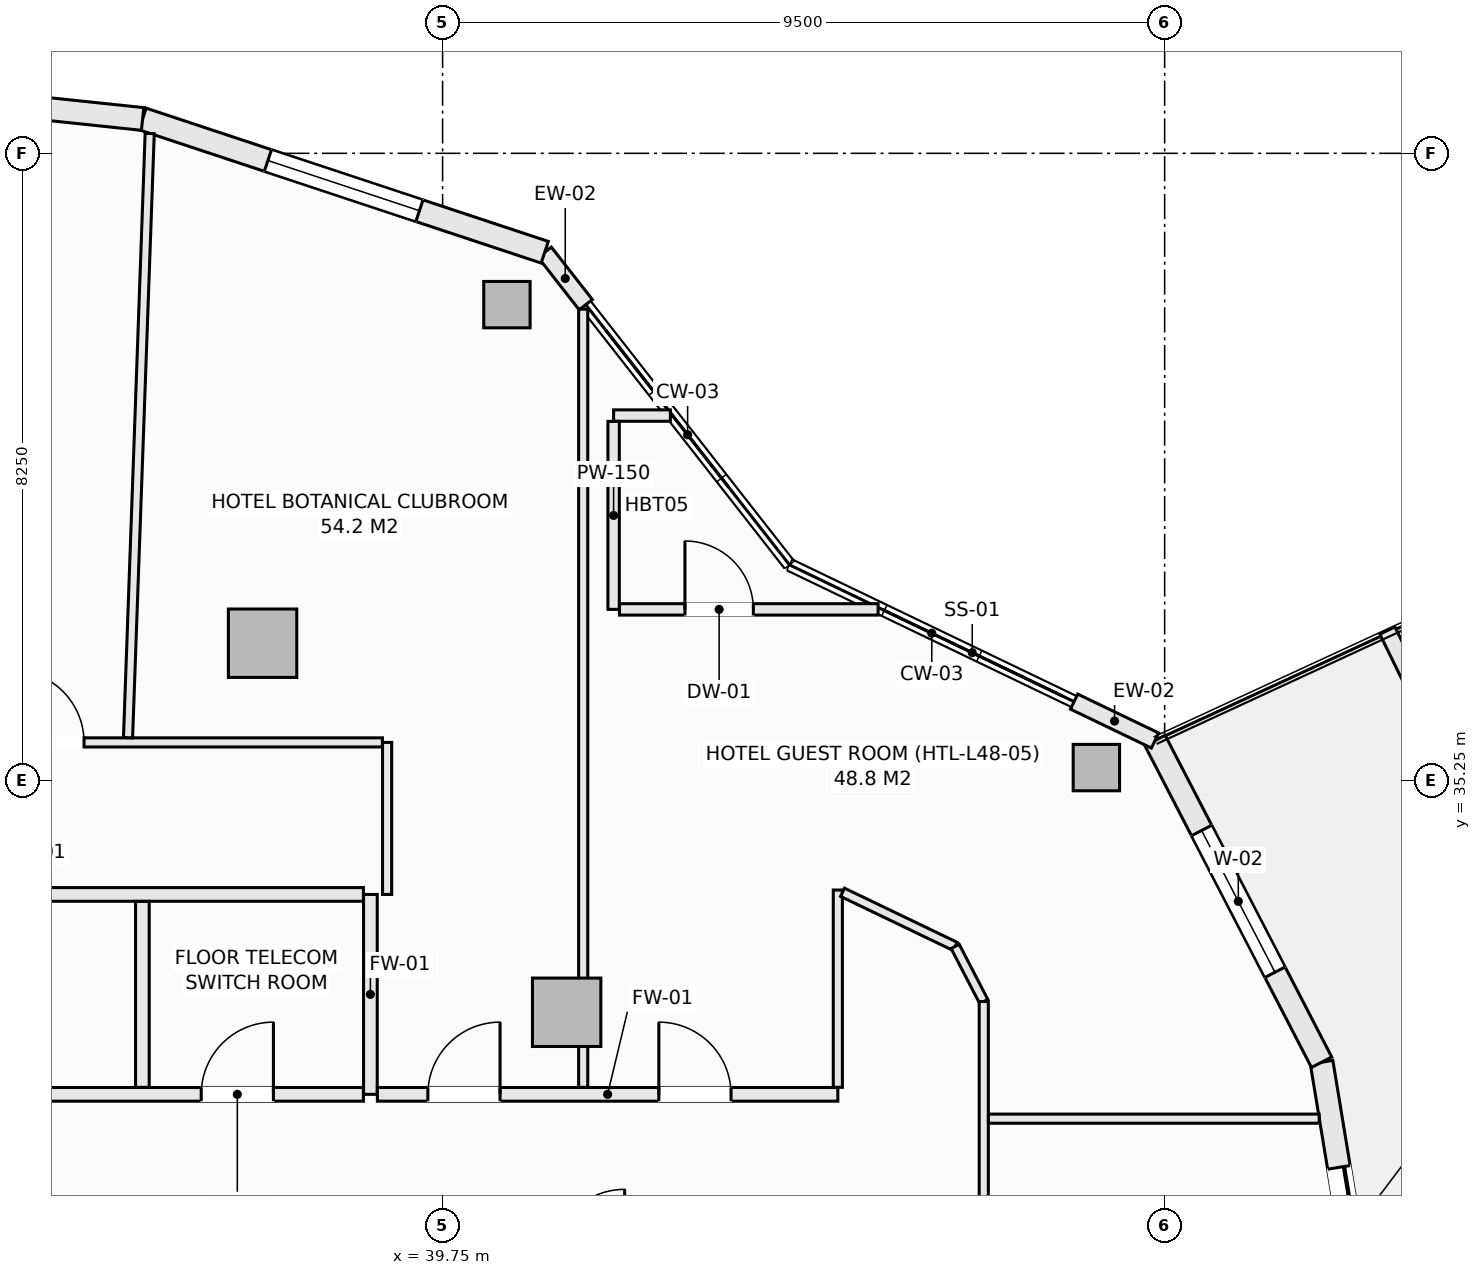
"""IFC4 building model, lengths in metres.
Left out: names, types, materials, properties, quantities, classifications, styles, units other than length and angle.
Written with IfcOpenShell. Run it as: python <this file> out.ifc"""

import sys

from ifc_helpers import new_model, si_unit, direction, frame, frame_2d, origin, origin_2d, place, context, subcontext, project, spatial, rectangle, hollow_rectangle, extrude, element, fill, save


model = new_model("IFC4")
c1 = context("Model", 3, precision=1e-05, world=origin(), true_north=direction((0.0, 1.0)))
c2 = subcontext(c1, "Body", "Model", "MODEL_VIEW")
j1 = project(units=[si_unit("LENGTHUNIT", "METRE"), si_unit("PLANEANGLEUNIT", "RADIAN")], contexts=[c1])
p1 = place(None, origin())
s1 = spatial("IfcSite", under=j1, at=p1, CompositionType="ELEMENT")
p2 = place(p1, origin())
s2 = spatial("IfcBuilding", under=s1, at=p2, CompositionType="ELEMENT")
p3 = place(p2, frame((0.0, 0.0, 183.5)))
s3 = spatial("IfcBuildingStorey", under=s2, at=p3, CompositionType="ELEMENT", Elevation=183.5)
for number, where, z_axis, x_axis in (
    (1, (48.352, 35.419, -0.27), (0.0, 0.0, 1.0), (1.0, 0.0, 0.0)),
    (2, (40.596, 41.51, -0.27), (0.0, 0.0, 1.0), (1.0, 0.0, 0.0)),
):
    element("IfcColumn", number, at=place(p3, frame(where, z_axis=z_axis, x_axis=x_axis)), inside=s3, PredefinedType="COLUMN", context=c2, shape_type="SweptSolid", body=[
        extrude(hollow_rectangle(XDim=0.61, YDim=0.61, WallThickness=0.025, at=origin_2d()), origin(), (0.0, 0.0, 1.0), 3.35),
    ])
for number, where, z_axis, x_axis in (
    (3, (41.382, 32.199, -0.27), (0.0, 0.0, 1.0), (1.0, 0.0, 0.0)),
    (4, (37.382, 37.055, -0.27), (0.0, 0.0, 1.0), (1.0, 0.0, 0.0)),
):
    element("IfcColumn", number, at=place(p3, frame(where, z_axis=z_axis, x_axis=x_axis)), inside=s3, PredefinedType="COLUMN", context=c2, shape_type="SweptSolid", body=[
        extrude(rectangle(XDim=0.9, YDim=0.9, at=origin_2d()), origin(), (0.0, 0.0, 1.0), 3.35),
    ])
p4 = place(p3, frame((51.315, 31.542, 0.0), z_axis=(0.0, 0.0, 1.0), x_axis=(0.162394765401, -0.986725868806, 0.0)))
e5 = element("IfcWall", 5, at=p4, inside=s3, PredefinedType="SOLIDWALL", context=c2, shape_type="SweptSolid", body=[
    extrude(rectangle(XDim=4.603, YDim=0.3, at=frame_2d((2.302, 0.0))), origin(), (0.0, 0.0, 1.0), 2.603),
])
p5 = place(p4, frame((1.402, 0.0, 0.0)))
e6 = element("IfcOpeningElement", 6, at=p5, cuts=e5, PredefinedType="OPENING", context=c2, shape_type="SweptSolid", body=[
    extrude(rectangle(XDim=1.8, YDim=2.25, at=frame_2d((0.9, 1.125))), frame((0.0, 0.16, 0.0), z_axis=(0.0, -1.0, 0.0), x_axis=(1.0, 0.0, 0.0)), (0.0, 0.0, 1.0), 0.32),
])
p6 = place(p3, frame((49.123, 35.775, 0.0), z_axis=(0.0, 0.0, 1.0), x_axis=(0.459810251451, -0.888017191647, 0.0)))
e7 = element("IfcWall", 7, at=p6, inside=s3, PredefinedType="SOLIDWALL", context=c2, shape_type="SweptSolid", body=[
    extrude(rectangle(XDim=4.766, YDim=0.3, at=frame_2d((2.383, 0.0))), origin(), (0.0, 0.0, 1.0), 2.603),
])
p7 = place(p6, frame((1.333, 0.0, 0.74)))
e8 = element("IfcOpeningElement", 8, at=p7, cuts=e7, PredefinedType="OPENING", context=c2, shape_type="SweptSolid", body=[
    extrude(rectangle(XDim=2.1, YDim=1.7, at=frame_2d((1.05, 0.85))), frame((0.0, 0.16, 0.0), z_axis=(0.0, -1.0, 0.0), x_axis=(1.0, 0.0, 0.0)), (0.0, 0.0, 1.0), 0.32),
])
p8 = place(p3, frame((48.059, 36.287, 0.0), z_axis=(0.0, 0.0, 1.0), x_axis=(0.901303636532, -0.433187897769, 0.0)))
e9 = element("IfcWall", 9, at=p8, inside=s3, PredefinedType="SOLIDWALL", context=c2, shape_type="SweptSolid", body=[
    extrude(rectangle(XDim=1.181, YDim=0.22, at=frame_2d((0.591, 0.0))), origin(), (0.0, 0.0, 1.0), 2.603),
])
p9 = place(p3, frame((41.094, 42.199, 0.0), z_axis=(0.0, 0.0, 1.0), x_axis=(0.616368366719, -0.787457958566, 0.0)))
e10 = element("IfcWall", 10, at=p9, inside=s3, PredefinedType="SOLIDWALL", context=c2, shape_type="SweptSolid", body=[
    extrude(rectangle(XDim=0.876, YDim=0.22, at=frame_2d((0.438, 0.0))), origin(), (0.0, 0.0, 1.0), 2.603),
])
p10 = place(p3, frame((35.803, 43.952, 0.0), z_axis=(0.0, 0.0, 1.0), x_axis=(0.949246811547, -0.314532177636, 0.0)))
e11 = element("IfcWall", 11, at=p10, inside=s3, PredefinedType="SOLIDWALL", context=c2, shape_type="SweptSolid", body=[
    extrude(rectangle(XDim=5.574, YDim=0.3, at=frame_2d((2.787, 0.0))), origin(), (0.0, 0.0, 1.0), 2.603),
])
p11 = place(p10, frame((1.737, 0.0, 0.74)))
e12 = element("IfcOpeningElement", 12, at=p11, cuts=e11, PredefinedType="OPENING", context=c2, shape_type="SweptSolid", body=[
    extrude(rectangle(XDim=2.1, YDim=1.7, at=frame_2d((1.05, 0.85))), frame((0.0, 0.16, 0.0), z_axis=(0.0, -1.0, 0.0), x_axis=(1.0, 0.0, 0.0)), (0.0, 0.0, 1.0), 0.32),
])
p12 = place(p3, frame((30.125, 44.55, 0.0), z_axis=(0.0, 0.0, 1.0), x_axis=(0.994496545245, -0.104769372887, 0.0)))
e13 = element("IfcWall", 13, at=p12, inside=s3, PredefinedType="SOLIDWALL", context=c2, shape_type="SweptSolid", body=[
    extrude(rectangle(XDim=5.709, YDim=0.3, at=frame_2d((2.854, 0.0))), origin(), (0.0, 0.0, 1.0), 2.603),
])
p13 = place(p12, frame((1.805, 0.0, 0.74)))
e14 = element("IfcOpeningElement", 14, at=p13, cuts=e13, PredefinedType="OPENING", context=c2, shape_type="SweptSolid", body=[
    extrude(rectangle(XDim=2.1, YDim=1.7, at=frame_2d((1.05, 0.85))), frame((0.0, 0.16, 0.0), z_axis=(0.0, -1.0, 0.0), x_axis=(1.0, 0.0, 0.0)), (0.0, 0.0, 1.0), 0.32),
])
p14 = place(p3, frame((52.18, 37.221, 0.0), z_axis=(0.0, 0.0, 1.0), x_axis=(0.439637174641, -0.898175458735, 0.0)))
e15 = element("IfcWall", 15, at=p14, inside=s3, PredefinedType="PARAPET", context=c2, shape_type="SweptSolid", body=[
    extrude(rectangle(XDim=5.567, YDim=0.22, at=frame_2d((2.784, 0.0))), origin(), (0.0, 0.0, 1.0), 0.52),
])
p15 = place(p3, frame((38.8, 31.12, 0.0), z_axis=(0.0, 0.0, 1.0), x_axis=(0.0, 1.0, 0.0)))
e16 = element("IfcWall", 16, at=p15, inside=s3, PredefinedType="SOLIDWALL", context=c2, shape_type="SweptSolid", body=[
    extrude(rectangle(XDim=2.63, YDim=0.18, at=frame_2d((1.315, 0.0))), origin(), (0.0, 0.0, 1.0), 3.08),
])
p16 = place(p3, frame((30.077, 31.12, 0.0), z_axis=(0.0, 0.0, 1.0), x_axis=(1.0, 0.0, 0.0)))
e17 = element("IfcWall", 17, at=p16, inside=s3, PredefinedType="SOLIDWALL", context=c2, shape_type="SweptSolid", body=[
    extrude(rectangle(XDim=8.631, YDim=0.18, at=frame_2d((4.315, 0.0))), origin(), (0.0, 0.0, 1.0), 3.08),
])
p17 = place(p16, frame((2.592, 0.0, 0.0)))
e18 = element("IfcOpeningElement", 18, at=p17, cuts=e17, PredefinedType="OPENING", context=c2, shape_type="SweptSolid", body=[
    extrude(rectangle(XDim=0.95, YDim=2.1, at=frame_2d((0.475, 1.05))), frame((0.0, 0.1, 0.0), z_axis=(0.0, -1.0, 0.0), x_axis=(1.0, 0.0, 0.0)), (0.0, 0.0, 1.0), 0.2),
])
p18 = place(p16, frame((6.497, 0.0, 0.0)))
e19 = element("IfcOpeningElement", 19, at=p18, cuts=e17, PredefinedType="OPENING", context=c2, shape_type="SweptSolid", body=[
    extrude(rectangle(XDim=0.95, YDim=2.1, at=frame_2d((0.475, 1.05))), frame((0.0, 0.1, 0.0), z_axis=(0.0, -1.0, 0.0), x_axis=(1.0, 0.0, 0.0)), (0.0, 0.0, 1.0), 0.2),
])
p19 = place(p3, frame((38.892, 31.12, 0.0), z_axis=(0.0, 0.0, 1.0), x_axis=(1.0, 0.0, 0.0)))
e20 = element("IfcWall", 20, at=p19, inside=s3, PredefinedType="SOLIDWALL", context=c2, shape_type="SweptSolid", body=[
    extrude(rectangle(XDim=6.058, YDim=0.18, at=frame_2d((3.029, 0.0))), origin(), (0.0, 0.0, 1.0), 3.08),
])
p20 = place(p19, frame((3.703, 0.0, 0.0)))
e21 = element("IfcOpeningElement", 21, at=p20, cuts=e20, PredefinedType="OPENING", context=c2, shape_type="SweptSolid", body=[
    extrude(rectangle(XDim=0.95, YDim=2.1, at=frame_2d((0.475, 1.05))), frame((0.0, 0.1, 0.0), z_axis=(0.0, -1.0, 0.0), x_axis=(1.0, 0.0, 0.0)), (0.0, 0.0, 1.0), 0.2),
])
p21 = place(p19, frame((0.664, 0.0, 0.0)))
e22 = element("IfcOpeningElement", 22, at=p21, cuts=e20, PredefinedType="OPENING", context=c2, shape_type="SweptSolid", body=[
    extrude(rectangle(XDim=0.95, YDim=2.1, at=frame_2d((0.475, 1.05))), frame((0.0, 0.1, 0.0), z_axis=(0.0, -1.0, 0.0), x_axis=(1.0, 0.0, 0.0)), (0.0, 0.0, 1.0), 0.2),
])
p22 = place(p3, frame((30.077, 33.75, 0.0), z_axis=(0.0, 0.0, 1.0), x_axis=(1.0, 0.0, 0.0)))
e23 = element("IfcWall", 23, at=p22, inside=s3, PredefinedType="SOLIDWALL", context=c2, shape_type="SweptSolid", body=[
    extrude(rectangle(XDim=8.631, YDim=0.18, at=frame_2d((4.315, 0.0))), origin(), (0.0, 0.0, 1.0), 3.08),
])
p23 = place(p3, frame((35.8, 31.212, 0.0), z_axis=(0.0, 0.0, 1.0), x_axis=(0.0, 1.0, 0.0)))
e24 = element("IfcWall", 24, at=p23, inside=s3, PredefinedType="SOLIDWALL", context=c2, shape_type="SweptSolid", body=[
    extrude(rectangle(XDim=2.446, YDim=0.18, at=frame_2d((1.223, 0.0))), origin(), (0.0, 0.0, 1.0), 3.08),
])
p24 = place(p3, frame((39.02, 33.75, 0.0), z_axis=(0.0, 0.0, 1.0), x_axis=(0.0, 1.0, 0.0)))
e25 = element("IfcWall", 25, at=p24, inside=s3, PredefinedType="PARTITIONING", context=c2, shape_type="SweptSolid", body=[
    extrude(rectangle(XDim=2.0, YDim=0.12, at=frame_2d((1.0, 0.0))), origin(), (0.0, 0.0, 1.0), 3.08),
])
p25 = place(p3, frame((29.842, 35.75, 0.0), z_axis=(0.0, 0.0, 1.0), x_axis=(1.0, 0.0, 0.0)))
e26 = element("IfcWall", 26, at=p25, inside=s3, PredefinedType="PARTITIONING", context=c2, shape_type="SweptSolid", body=[
    extrude(rectangle(XDim=9.116, YDim=0.12, at=frame_2d((4.558, 0.0))), origin(), (0.0, 0.0, 1.0), 2.455),
])
p26 = place(p25, frame((4.24, 0.0, 0.0)))
e27 = element("IfcOpeningElement", 27, at=p26, cuts=e26, PredefinedType="OPENING", context=c2, shape_type="SweptSolid", body=[
    extrude(rectangle(XDim=0.95, YDim=2.1, at=frame_2d((0.475, 1.05))), frame((0.0, 0.07, 0.0), z_axis=(0.0, -1.0, 0.0), x_axis=(1.0, 0.0, 0.0)), (0.0, 0.0, 1.0), 0.14),
])
p27 = place(p25, frame((1.785, 0.0, 0.0)))
e28 = element("IfcOpeningElement", 28, at=p27, cuts=e26, PredefinedType="OPENING", context=c2, shape_type="SweptSolid", body=[
    extrude(rectangle(XDim=0.95, YDim=2.1, at=frame_2d((0.475, 1.05))), frame((0.0, 0.07, 0.0), z_axis=(0.0, -1.0, 0.0), x_axis=(1.0, 0.0, 0.0)), (0.0, 0.0, 1.0), 0.14),
])
p28 = place(p3, frame((44.95, 31.212, 0.0), z_axis=(0.0, 0.0, 1.0), x_axis=(0.0, 1.0, 0.0)))
e29 = element("IfcWall", 29, at=p28, inside=s3, PredefinedType="PARTITIONING", context=c2, shape_type="SweptSolid", body=[
    extrude(rectangle(XDim=2.596, YDim=0.12, at=frame_2d((1.298, 0.0))), origin(), (0.0, 0.0, 1.0), 3.08),
])
p29 = place(p3, frame((45.012, 33.778, 0.0), z_axis=(0.0, 0.0, 1.0), x_axis=(0.901268034538, -0.433261964544, 0.0)))
e30 = element("IfcWall", 30, at=p29, inside=s3, PredefinedType="PARTITIONING", context=c2, shape_type="SweptSolid", body=[
    extrude(rectangle(XDim=1.644, YDim=0.12, at=frame_2d((0.822, 0.0))), origin(), (0.0, 0.0, 1.0), 3.08),
])
p30 = place(p3, frame((46.494, 33.066, 0.0), z_axis=(0.0, 0.0, 1.0), x_axis=(0.460674892026, -0.887568951607, 0.0)))
e31 = element("IfcWall", 31, at=p30, inside=s3, PredefinedType="PARTITIONING", context=c2, shape_type="SweptSolid", body=[
    extrude(rectangle(XDim=0.817, YDim=0.12, at=frame_2d((0.408, 0.0))), origin(), (0.0, 0.0, 1.0), 3.08),
])
p31 = place(p3, frame((46.87, 21.659, 0.0), z_axis=(0.0, 0.0, 1.0), x_axis=(0.0, 1.0, 0.0)))
e32 = element("IfcWall", 32, at=p31, inside=s3, PredefinedType="PARTITIONING", context=c2, shape_type="SweptSolid", body=[
    extrude(rectangle(XDim=10.682, YDim=0.12, at=frame_2d((5.341, 0.0))), origin(), (0.0, 0.0, 1.0), 3.08),
])
p32 = place(p31, frame((4.866, 0.0, 0.0)))
e33 = element("IfcOpeningElement", 33, at=p32, cuts=e32, PredefinedType="OPENING", context=c2, shape_type="SweptSolid", body=[
    extrude(rectangle(XDim=0.95, YDim=2.1, at=frame_2d((0.475, 1.05))), frame((0.0, 0.07, 0.0), z_axis=(0.0, -1.0, 0.0), x_axis=(1.0, 0.0, 0.0)), (0.0, 0.0, 1.0), 0.14),
])
p33 = place(p3, frame((46.932, 30.8, 0.0), z_axis=(0.0, 0.0, 1.0), x_axis=(1.0, 0.0, 0.0)))
e34 = element("IfcWall", 34, at=p33, inside=s3, PredefinedType="PARTITIONING", context=c2, shape_type="SweptSolid", body=[
    extrude(rectangle(XDim=4.351, YDim=0.12, at=frame_2d((2.176, 0.0))), origin(), (0.0, 0.0, 1.0), 3.08),
])
p34 = place(p3, frame((41.6, 31.212, 0.0), z_axis=(0.0, 0.0, 1.0), x_axis=(0.0, 1.0, 0.0)))
e35 = element("IfcWall", 35, at=p34, inside=s3, PredefinedType="PARTITIONING", context=c2, shape_type="SweptSolid", body=[
    extrude(rectangle(XDim=10.238, YDim=0.12, at=frame_2d((5.119, 0.0))), origin(), (0.0, 0.0, 1.0), 2.455),
])
p35 = place(p3, frame((42.0, 40.05, 0.0), z_axis=(0.0, 0.0, 1.0), x_axis=(1.0, 0.0, 0.0)))
e36 = element("IfcWall", 36, at=p35, inside=s3, PredefinedType="PARTITIONING", context=c2, shape_type="SweptSolid", body=[
    extrude(rectangle(XDim=0.747, YDim=0.15, at=frame_2d((0.373, 0.0))), origin(), (0.0, 0.0, 1.0), 2.603),
])
p36 = place(p3, frame((42.0, 37.5, 0.0), z_axis=(0.0, 0.0, 1.0), x_axis=(0.0, 1.0, 0.0)))
e37 = element("IfcWall", 37, at=p36, inside=s3, PredefinedType="PARTITIONING", context=c2, shape_type="SweptSolid", body=[
    extrude(rectangle(XDim=2.473, YDim=0.15, at=frame_2d((1.236, 0.0))), origin(), (0.0, 0.0, 1.0), 3.08),
])
p37 = place(p3, frame((42.077, 37.5, 0.0), z_axis=(0.0, 0.0, 1.0), x_axis=(1.0, 0.0, 0.0)))
e38 = element("IfcWall", 38, at=p37, inside=s3, PredefinedType="PARTITIONING", context=c2, shape_type="SweptSolid", body=[
    extrude(rectangle(XDim=3.403, YDim=0.15, at=frame_2d((1.702, 0.0))), origin(), (0.0, 0.0, 1.0), 2.603),
])
p38 = place(p37, frame((0.862, 0.0, 0.0)))
e39 = element("IfcOpeningElement", 39, at=p38, cuts=e38, PredefinedType="OPENING", context=c2, shape_type="SweptSolid", body=[
    extrude(rectangle(XDim=0.9, YDim=2.1, at=frame_2d((0.45, 1.05))), frame((0.0, 0.085, 0.0), z_axis=(0.0, -1.0, 0.0), x_axis=(1.0, 0.0, 0.0)), (0.0, 0.0, 1.0), 0.17),
])
p39 = place(p3, frame((35.611, 35.812, 0.0), z_axis=(0.0, 0.0, 1.0), x_axis=(0.035850277254, 0.999357172197, 0.0)))
e40 = element("IfcWall", 40, at=p39, inside=s3, PredefinedType="PARTITIONING", context=c2, shape_type="SweptSolid", body=[
    extrude(rectangle(XDim=7.954, YDim=0.12, at=frame_2d((3.977, 0.0))), origin(), (0.0, 0.0, 1.0), 3.08),
])
p40 = place(p5, origin())
e41 = element("IfcDoor", 41, at=p40, inside=s3, OperationType="SLIDING_TO_LEFT", PredefinedType="DOOR", context=c2, shape_type="SweptSolid", body=[
    extrude(rectangle(XDim=1.8, YDim=2.25, at=frame_2d((0.9, 1.125))), frame((0.0, 0.025, 0.0), z_axis=(0.0, -1.0, 0.0), x_axis=(1.0, 0.0, 0.0)), (0.0, 0.0, 1.0), 0.05),
])
fill(e6, e41)
p41 = place(p7, origin())
e42 = element("IfcWindow", 42, at=p41, inside=s3, PartitioningType="SINGLE_PANEL", PredefinedType="WINDOW", context=c2, shape_type="SweptSolid", body=[
    extrude(rectangle(XDim=2.1, YDim=1.7, at=frame_2d((1.05, 0.85))), frame((0.0, 0.03, 0.0), z_axis=(0.0, -1.0, 0.0), x_axis=(1.0, 0.0, 0.0)), (0.0, 0.0, 1.0), 0.06),
])
fill(e8, e42)
p42 = place(p11, origin())
e43 = element("IfcWindow", 43, at=p42, inside=s3, PartitioningType="SINGLE_PANEL", PredefinedType="WINDOW", context=c2, shape_type="SweptSolid", body=[
    extrude(rectangle(XDim=2.1, YDim=1.7, at=frame_2d((1.05, 0.85))), frame((0.0, 0.03, 0.0), z_axis=(0.0, -1.0, 0.0), x_axis=(1.0, 0.0, 0.0)), (0.0, 0.0, 1.0), 0.06),
])
fill(e12, e43)
p43 = place(p18, origin())
e44 = element("IfcDoor", 44, at=p43, inside=s3, OperationType="SINGLE_SWING_RIGHT", PredefinedType="DOOR", context=c2, shape_type="SweptSolid", body=[
    extrude(rectangle(XDim=0.95, YDim=2.1, at=frame_2d((0.475, 1.05))), frame((0.0, 0.025, 0.0), z_axis=(0.0, -1.0, 0.0), x_axis=(1.0, 0.0, 0.0)), (0.0, 0.0, 1.0), 0.05),
])
fill(e19, e44)
p44 = place(p20, origin())
e45 = element("IfcDoor", 45, at=p44, inside=s3, OperationType="SINGLE_SWING_LEFT", PredefinedType="DOOR", context=c2, shape_type="SweptSolid", body=[
    extrude(rectangle(XDim=0.95, YDim=2.1, at=frame_2d((0.475, 1.05))), frame((0.0, 0.025, 0.0), z_axis=(0.0, -1.0, 0.0), x_axis=(1.0, 0.0, 0.0)), (0.0, 0.0, 1.0), 0.05),
])
fill(e21, e45)
p45 = place(p21, origin())
e46 = element("IfcDoor", 46, at=p45, inside=s3, OperationType="SINGLE_SWING_RIGHT", PredefinedType="DOOR", context=c2, shape_type="SweptSolid", body=[
    extrude(rectangle(XDim=0.95, YDim=2.1, at=frame_2d((0.475, 1.05))), frame((0.0, 0.025, 0.0), z_axis=(0.0, -1.0, 0.0), x_axis=(1.0, 0.0, 0.0)), (0.0, 0.0, 1.0), 0.05),
])
fill(e22, e46)
p46 = place(p26, origin())
e47 = element("IfcDoor", 47, at=p46, inside=s3, OperationType="SINGLE_SWING_LEFT", PredefinedType="DOOR", context=c2, shape_type="SweptSolid", body=[
    extrude(rectangle(XDim=0.95, YDim=2.1, at=frame_2d((0.475, 1.05))), frame((0.0, 0.025, 0.0), z_axis=(0.0, -1.0, 0.0), x_axis=(1.0, 0.0, 0.0)), (0.0, 0.0, 1.0), 0.05),
])
fill(e27, e47)
p47 = place(p38, origin())
e48 = element("IfcDoor", 48, at=p47, inside=s3, OperationType="SINGLE_SWING_LEFT", PredefinedType="DOOR", context=c2, shape_type="SweptSolid", body=[
    extrude(rectangle(XDim=0.9, YDim=2.1, at=frame_2d((0.45, 1.05))), frame((0.0, 0.025, 0.0), z_axis=(0.0, -1.0, 0.0), x_axis=(1.0, 0.0, 0.0)), (0.0, 0.0, 1.0), 0.05),
])
fill(e39, e48)
save(model, sys.argv[1])
